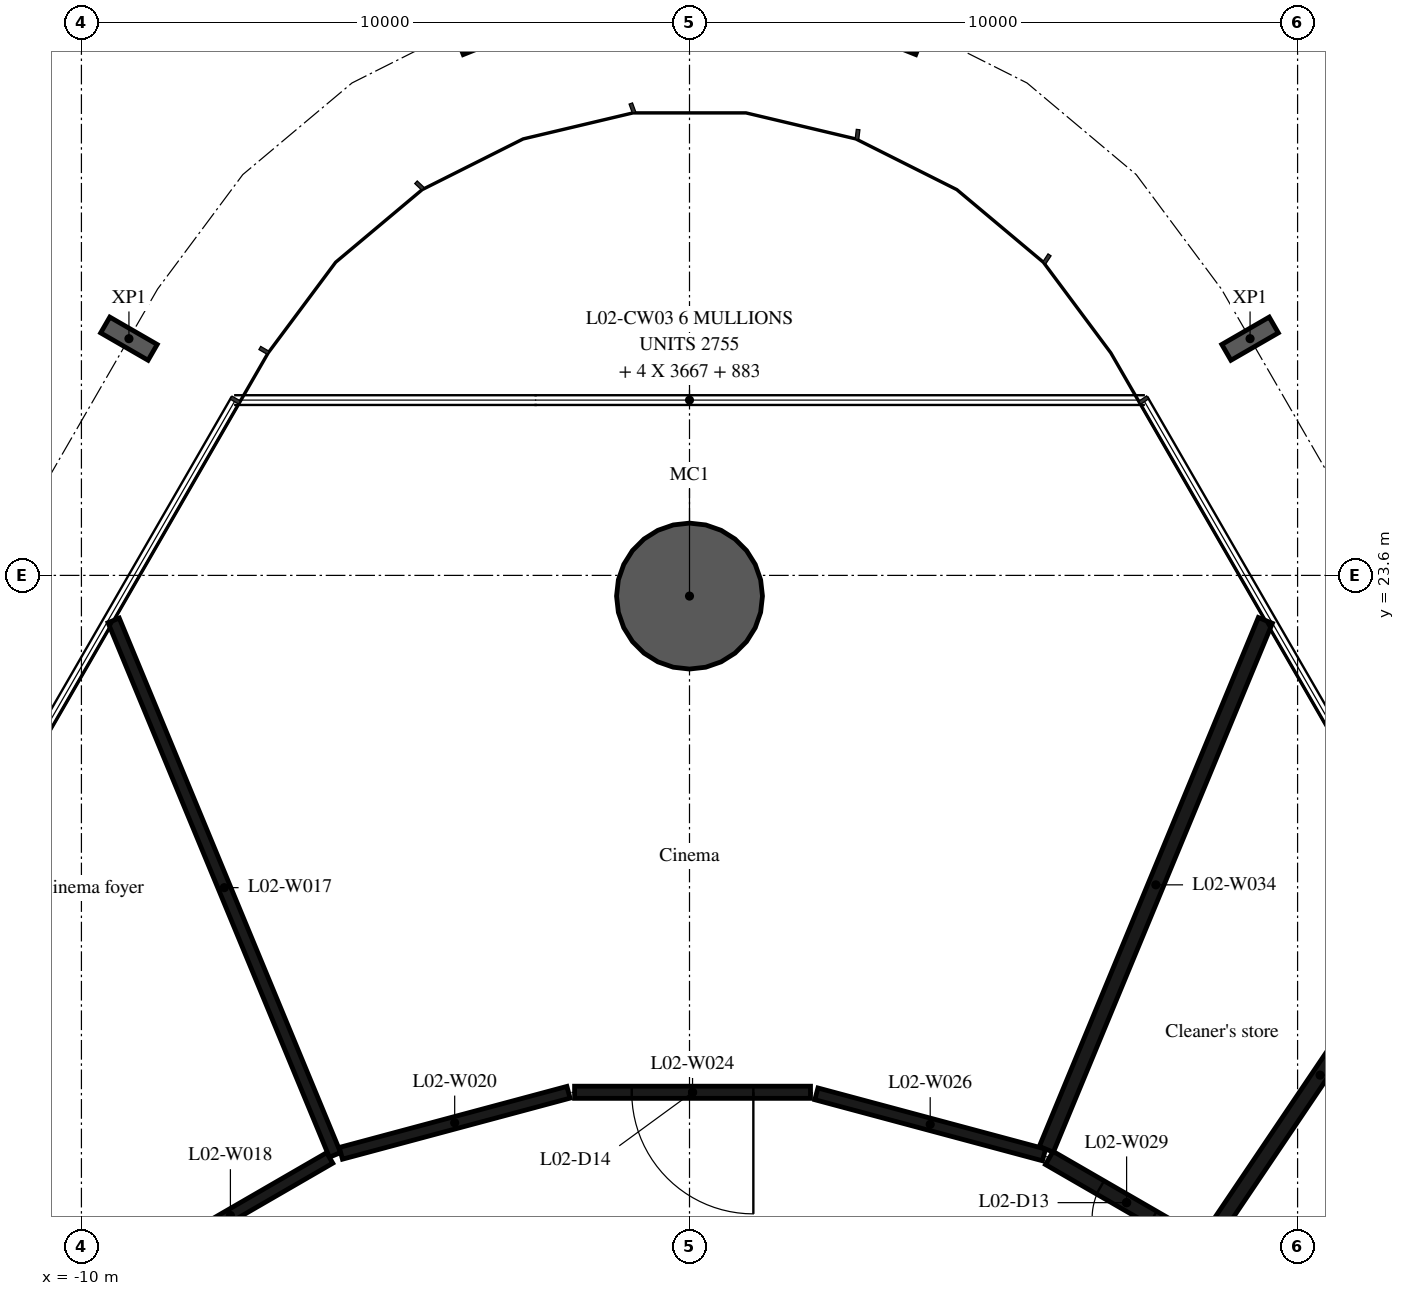
"""IFC4 building model, lengths in metres.
Left out: names, types, materials, properties, quantities, classifications, styles, units other than length and angle.
Written with IfcOpenShell. Run it as: python <this file> out.ifc"""

import sys

from ifc_helpers import new_model, si_unit, direction, frame, frame_2d, origin, origin_2d, place, context, subcontext, project, spatial, rectangle, hollow_circle, i_section, extrude, element, fill, save


model = new_model("IFC4")
c1 = context("Model", 3, precision=1e-05, world=origin(), true_north=direction((0.0, 1.0)))
c2 = subcontext(c1, "Body", "Model", "MODEL_VIEW")
j1 = project(units=[si_unit("LENGTHUNIT", "METRE"), si_unit("PLANEANGLEUNIT", "RADIAN")], contexts=[c1])
p1 = place(None, origin())
s1 = spatial("IfcSite", under=j1, at=p1, CompositionType="ELEMENT")
p2 = place(p1, origin())
s2 = spatial("IfcBuilding", under=s1, at=p2, CompositionType="ELEMENT")
p3 = place(p2, frame((0.0, 0.0, 13.8)))
s3 = spatial("IfcBuildingStorey", under=s2, at=p3, CompositionType="ELEMENT", Elevation=13.8)
p4 = place(p3, frame((0.0, 23.26, -0.38), z_axis=(0.0, 0.0, 1.0), x_axis=(1.0, 0.0, 0.0)))
e1 = element("IfcColumn", 1, at=p4, inside=s3, PredefinedType="COLUMN", context=c2, shape_type="SweptSolid", body=[
    extrude(hollow_circle(Radius=1.2, WallThickness=0.06, at=origin_2d()), origin(), (0.0, 0.0, 1.0), 4.8),
])
for number, where, z_axis, x_axis in (
    (2, (9.219, 27.493, -0.38), (0.0, 0.0, 1.0), (0.5, -0.866, 0.0)),
    (3, (3.748, 32.639, -0.38), (0.0, 0.0, 1.0), (0.929, -0.371, 0.0)),
    (4, (-3.748, 32.639, -0.38), (0.0, 0.0, 1.0), (0.929, 0.371, 0.0)),
    (5, (-9.219, 27.493, -0.38), (0.0, 0.0, 1.0), (0.5, 0.866, 0.0)),
):
    element("IfcColumn", number, at=place(p3, frame(where, z_axis=z_axis, x_axis=x_axis)), inside=s3, PredefinedType="COLUMN", context=c2, shape_type="SweptSolid", body=[
        extrude(i_section(OverallWidth=0.3, OverallDepth=0.9, WebThickness=0.019, FlangeThickness=0.035, FilletRadius=0.03, at=origin_2d()), origin(), (0.0, 0.0, 1.0), 4.8),
    ])
p5 = place(p3, frame((-5.83, 14.07, 0.0), z_axis=(0.0, 0.0, 1.0), x_axis=(-0.382588257379, 0.923918949538, 0.0)))
e6 = element("IfcWall", 6, at=p5, inside=s3, PredefinedType="PARTITIONING", context=c2, shape_type="SweptSolid", body=[
    extrude(rectangle(XDim=9.514, YDim=0.2, at=frame_2d((4.757, 0.0))), origin(), (0.0, 0.0, 1.0), 4.42),
])
p6 = place(p3, frame((-5.917, 14.02, 0.0), z_axis=(0.0, 0.0, 1.0), x_axis=(-0.865591582237, -0.500750649286, 0.0)))
e7 = element("IfcWall", 7, at=p6, inside=s3, PredefinedType="PARTITIONING", context=c2, shape_type="SweptSolid", body=[
    extrude(rectangle(XDim=3.774, YDim=0.2, at=frame_2d((1.887, 0.0))), origin(), (0.0, 0.0, 1.0), 4.42),
])
p7 = place(p3, frame((-1.99, 15.1, 0.0), z_axis=(0.0, 0.0, 1.0), x_axis=(-0.96585437197, -0.259085569159, 0.0)))
e8 = element("IfcWall", 8, at=p7, inside=s3, PredefinedType="PARTITIONING", context=c2, shape_type="SweptSolid", body=[
    extrude(rectangle(XDim=3.876, YDim=0.2, at=frame_2d((1.938, 0.0))), origin(), (0.0, 0.0, 1.0), 4.42),
])
p8 = place(p3, frame((1.99, 15.1, 0.0), z_axis=(0.0, 0.0, 1.0), x_axis=(-1.0, 0.0, 0.0)))
e9 = element("IfcWall", 9, at=p8, inside=s3, PredefinedType="PARTITIONING", context=c2, shape_type="SweptSolid", body=[
    extrude(rectangle(XDim=3.88, YDim=0.2, at=frame_2d((1.94, 0.0))), origin(), (0.0, 0.0, 1.0), 4.42),
])
p9 = place(p8, frame((0.94, 0.0, 0.0)))
e10 = element("IfcOpeningElement", 10, at=p9, cuts=e9, PredefinedType="OPENING", context=c2, shape_type="SweptSolid", body=[
    extrude(rectangle(XDim=2.0, YDim=2.1, at=frame_2d((1.0, 1.05))), frame((0.0, 0.11, 0.0), z_axis=(0.0, -1.0, 0.0), x_axis=(1.0, 0.0, 0.0)), (0.0, 0.0, 1.0), 0.22),
])
p10 = place(p3, frame((5.83, 14.07, 0.0), z_axis=(0.0, 0.0, 1.0), x_axis=(-0.965870133458, 0.259026804199, 0.0)))
e11 = element("IfcWall", 11, at=p10, inside=s3, PredefinedType="PARTITIONING", context=c2, shape_type="SweptSolid", body=[
    extrude(rectangle(XDim=3.876, YDim=0.2, at=frame_2d((1.938, 0.0))), origin(), (0.0, 0.0, 1.0), 4.42),
])
p11 = place(p3, frame((8.46, 12.55, 0.0), z_axis=(0.0, 0.0, 1.0), x_axis=(-0.865803467568, 0.500384207931, 0.0)))
e12 = element("IfcWall", 12, at=p11, inside=s3, PredefinedType="PARTITIONING", context=c2, shape_type="SweptSolid", body=[
    extrude(rectangle(XDim=2.938, YDim=0.25, at=frame_2d((1.469, 0.0))), origin(), (0.0, 0.0, 1.0), 4.42),
])
p12 = place(p11, frame((0.969, 0.0, 0.0)))
e13 = element("IfcOpeningElement", 13, at=p12, cuts=e12, PredefinedType="OPENING", context=c2, shape_type="SweptSolid", body=[
    extrude(rectangle(XDim=1.0, YDim=2.1, at=frame_2d((0.5, 1.05))), frame((0.0, 0.135, 0.0), z_axis=(0.0, -1.0, 0.0), x_axis=(1.0, 0.0, 0.0)), (0.0, 0.0, 1.0), 0.27),
])
p13 = place(p3, frame((8.53, 12.654, 0.0), z_axis=(0.0, 0.0, 1.0), x_axis=(0.559160642802, 0.829059331738, 0.0)))
e14 = element("IfcWall", 14, at=p13, inside=s3, PredefinedType="PARTITIONING", context=c2, shape_type="SweptSolid", body=[
    extrude(rectangle(XDim=6.582, YDim=0.25, at=frame_2d((3.291, 0.0))), origin(), (0.0, 0.0, 1.0), 4.42),
])
p14 = place(p3, frame((9.47, 22.86, 0.0), z_axis=(0.0, 0.0, 1.0), x_axis=(-0.382599926304, -0.923914117433, 0.0)))
e15 = element("IfcWall", 15, at=p14, inside=s3, PredefinedType="PARTITIONING", context=c2, shape_type="SweptSolid", body=[
    extrude(rectangle(XDim=9.414, YDim=0.25, at=frame_2d((4.707, 0.0))), origin(), (0.0, 0.0, 1.0), 4.42),
])
p15 = place(p12, origin())
e16 = element("IfcDoor", 16, at=p15, inside=s3, OperationType="SINGLE_SWING_LEFT", PredefinedType="DOOR", context=c2, shape_type="SweptSolid", body=[
    extrude(rectangle(XDim=1.0, YDim=2.1, at=frame_2d((0.5, 1.05))), frame((0.0, 0.025, 0.0), z_axis=(0.0, -1.0, 0.0), x_axis=(1.0, 0.0, 0.0)), (0.0, 0.0, 1.0), 0.05),
])
fill(e13, e16)
p16 = place(p9, origin())
e17 = element("IfcDoor", 17, at=p16, inside=s3, OperationType="DOUBLE_DOOR_SINGLE_SWING", PredefinedType="DOOR", context=c2, shape_type="SweptSolid", body=[
    extrude(rectangle(XDim=2.0, YDim=2.1, at=frame_2d((1.0, 1.05))), frame((0.0, 0.025, 0.0), z_axis=(0.0, -1.0, 0.0), x_axis=(1.0, 0.0, 0.0)), (0.0, 0.0, 1.0), 0.05),
])
fill(e10, e17)
save(model, sys.argv[1])
